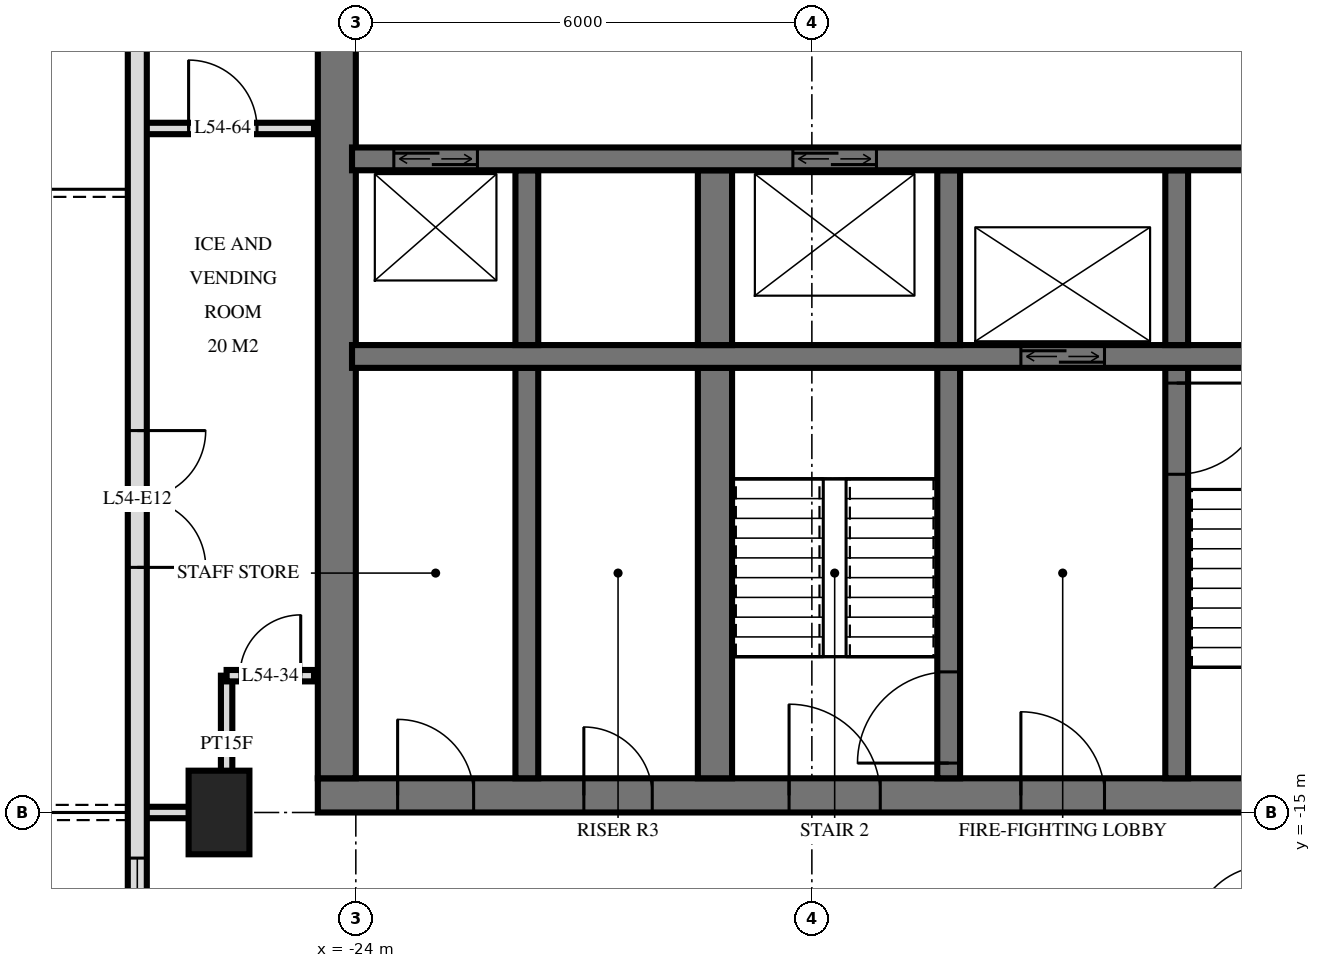
"""IFC4 building model, lengths in metres.
Left out: names, types, materials, properties, quantities, classifications, styles, units other than length and angle.
Written with IfcOpenShell. Run it as: python <this file> out.ifc"""

import sys

from ifc_helpers import new_model, si_unit, direction, frame, frame_2d, origin, origin_2d, place, context, subcontext, project, spatial, rectangle, extrude, element, fill, save


model = new_model("IFC4")
c1 = context("Model", 3, precision=1e-05, world=origin(), true_north=direction((0.0, 1.0)))
c2 = subcontext(c1, "Body", "Model", "MODEL_VIEW")
j1 = project(units=[si_unit("LENGTHUNIT", "METRE"), si_unit("PLANEANGLEUNIT", "RADIAN")], contexts=[c1])
p1 = place(None, origin())
s1 = spatial("IfcSite", under=j1, at=p1, CompositionType="ELEMENT")
p2 = place(p1, origin())
s2 = spatial("IfcBuilding", under=s1, at=p2, CompositionType="ELEMENT")
p3 = place(p2, frame((0.0, 0.0, 208.1)))
s3 = spatial("IfcBuildingStorey", under=s2, at=p3, CompositionType="ELEMENT", Elevation=208.1)
p4 = place(p3, frame((-25.8, -15.0, 0.0), z_axis=(0.0, 0.0, 1.0), x_axis=(0.0, 1.0, 0.0)))
e1 = element("IfcColumn", 1, at=p4, inside=s3, PredefinedType="COLUMN", context=c2, shape_type="SweptSolid", body=[
    extrude(rectangle(XDim=1.1, YDim=0.8, at=origin_2d()), origin(), (0.0, 0.0, 1.0), 3.5),
])
p5 = place(p3, frame((-24.5, -14.775, 0.0), z_axis=(0.0, 0.0, 1.0), x_axis=(1.0, 0.0, 0.0)))
e2 = element("IfcWall", 2, at=p5, inside=s3, PredefinedType="SHEAR", context=c2, shape_type="SweptSolid", body=[
    extrude(rectangle(XDim=14.5, YDim=0.45, at=frame_2d((7.25, 0.0))), origin(), (0.0, 0.0, 1.0), 3.5),
])
p6 = place(p5, frame((6.2, 0.0, 0.0)))
e3 = element("IfcOpeningElement", 3, at=p6, cuts=e2, PredefinedType="OPENING", context=c2, shape_type="SweptSolid", body=[
    extrude(rectangle(XDim=1.2, YDim=2.1, at=frame_2d((0.6, 1.05))), frame((0.0, 0.235, 0.0), z_axis=(0.0, -1.0, 0.0), x_axis=(1.0, 0.0, 0.0)), (0.0, 0.0, 1.0), 0.47),
])
p7 = place(p5, frame((9.25, 0.0, 0.0)))
e4 = element("IfcOpeningElement", 4, at=p7, cuts=e2, PredefinedType="OPENING", context=c2, shape_type="SweptSolid", body=[
    extrude(rectangle(XDim=1.1, YDim=2.1, at=frame_2d((0.55, 1.05))), frame((0.0, 0.235, 0.0), z_axis=(0.0, -1.0, 0.0), x_axis=(1.0, 0.0, 0.0)), (0.0, 0.0, 1.0), 0.47),
])
p8 = place(p5, frame((3.5, 0.0, 0.0)))
e5 = element("IfcOpeningElement", 5, at=p8, cuts=e2, PredefinedType="OPENING", context=c2, shape_type="SweptSolid", body=[
    extrude(rectangle(XDim=0.9, YDim=2.1, at=frame_2d((0.45, 1.05))), frame((0.0, 0.235, 0.0), z_axis=(0.0, -1.0, 0.0), x_axis=(1.0, 0.0, 0.0)), (0.0, 0.0, 1.0), 0.47),
])
p9 = place(p5, frame((1.05, 0.0, 0.0)))
e6 = element("IfcOpeningElement", 6, at=p9, cuts=e2, PredefinedType="OPENING", context=c2, shape_type="SweptSolid", body=[
    extrude(rectangle(XDim=1.0, YDim=2.1, at=frame_2d((0.5, 1.05))), frame((0.0, 0.235, 0.0), z_axis=(0.0, -1.0, 0.0), x_axis=(1.0, 0.0, 0.0)), (0.0, 0.0, 1.0), 0.47),
])
p10 = place(p3, frame((-24.25, -14.55, 0.0), z_axis=(0.0, 0.0, 1.0), x_axis=(0.0, 1.0, 0.0)))
e7 = element("IfcWall", 7, at=p10, inside=s3, PredefinedType="SHEAR", context=c2, shape_type="SweptSolid", body=[
    extrude(rectangle(XDim=14.1, YDim=0.5, at=frame_2d((7.05, 0.0))), origin(), (0.0, 0.0, 1.0), 3.5),
])
p11 = place(p3, frame((-24.05, -6.4, 0.0), z_axis=(0.0, 0.0, 1.0), x_axis=(1.0, 0.0, 0.0)))
e8 = element("IfcWall", 8, at=p11, inside=s3, PredefinedType="SHEAR", context=c2, shape_type="SweptSolid", body=[
    extrude(rectangle(XDim=13.7, YDim=0.3, at=frame_2d((6.85, 0.0))), origin(), (0.0, 0.0, 1.0), 3.5),
])
p12 = place(p11, frame((0.55, 0.0, 0.0)))
e9 = element("IfcOpeningElement", 9, at=p12, cuts=e8, PredefinedType="OPENING", context=c2, shape_type="SweptSolid", body=[
    extrude(rectangle(XDim=1.1, YDim=2.1, at=frame_2d((0.55, 1.05))), frame((0.0, 0.16, 0.0), z_axis=(0.0, -1.0, 0.0), x_axis=(1.0, 0.0, 0.0)), (0.0, 0.0, 1.0), 0.32),
])
p13 = place(p11, frame((5.8, 0.0, 0.0)))
e10 = element("IfcOpeningElement", 10, at=p13, cuts=e8, PredefinedType="OPENING", context=c2, shape_type="SweptSolid", body=[
    extrude(rectangle(XDim=1.1, YDim=2.1, at=frame_2d((0.55, 1.05))), frame((0.0, 0.16, 0.0), z_axis=(0.0, -1.0, 0.0), x_axis=(1.0, 0.0, 0.0)), (0.0, 0.0, 1.0), 0.32),
])
p14 = place(p3, frame((-24.05, -9.0, 0.0), z_axis=(0.0, 0.0, 1.0), x_axis=(1.0, 0.0, 0.0)))
e11 = element("IfcWall", 11, at=p14, inside=s3, PredefinedType="SHEAR", context=c2, shape_type="SweptSolid", body=[
    extrude(rectangle(XDim=13.7, YDim=0.3, at=frame_2d((6.85, 0.0))), origin(), (0.0, 0.0, 1.0), 3.5),
])
p15 = place(p14, frame((8.8, 0.0, 0.0)))
e12 = element("IfcOpeningElement", 12, at=p15, cuts=e11, PredefinedType="OPENING", context=c2, shape_type="SweptSolid", body=[
    extrude(rectangle(XDim=1.1, YDim=2.1, at=frame_2d((0.55, 1.05))), frame((0.0, 0.16, 0.0), z_axis=(0.0, -1.0, 0.0), x_axis=(1.0, 0.0, 0.0)), (0.0, 0.0, 1.0), 0.32),
])
p16 = place(p3, frame((-13.2, -8.85, 0.0), z_axis=(0.0, 0.0, 1.0), x_axis=(0.0, 1.0, 0.0)))
e13 = element("IfcWall", 13, at=p16, inside=s3, PredefinedType="SHEAR", context=c2, shape_type="SweptSolid", body=[
    extrude(rectangle(XDim=2.3, YDim=0.3, at=frame_2d((1.15, 0.0))), origin(), (0.0, 0.0, 1.0), 3.5),
])
p17 = place(p3, frame((-13.2, -14.55, 0.0), z_axis=(0.0, 0.0, 1.0), x_axis=(0.0, 1.0, 0.0)))
e14 = element("IfcWall", 14, at=p17, inside=s3, PredefinedType="SHEAR", context=c2, shape_type="SweptSolid", body=[
    extrude(rectangle(XDim=5.4, YDim=0.3, at=frame_2d((2.7, 0.0))), origin(), (0.0, 0.0, 1.0), 3.5),
])
p18 = place(p17, frame((4.0, 0.0, 0.0)))
e15 = element("IfcOpeningElement", 15, at=p18, cuts=e14, PredefinedType="OPENING", context=c2, shape_type="SweptSolid", body=[
    extrude(rectangle(XDim=1.2, YDim=2.1, at=frame_2d((0.6, 1.05))), frame((0.0, 0.16, 0.0), z_axis=(0.0, -1.0, 0.0), x_axis=(1.0, 0.0, 0.0)), (0.0, 0.0, 1.0), 0.32),
])
p19 = place(p3, frame((-16.2, -8.85, 0.0), z_axis=(0.0, 0.0, 1.0), x_axis=(0.0, 1.0, 0.0)))
e16 = element("IfcWall", 16, at=p19, inside=s3, PredefinedType="SHEAR", context=c2, shape_type="SweptSolid", body=[
    extrude(rectangle(XDim=2.3, YDim=0.3, at=frame_2d((1.15, 0.0))), origin(), (0.0, 0.0, 1.0), 3.5),
])
p20 = place(p3, frame((-16.2, -14.55, 0.0), z_axis=(0.0, 0.0, 1.0), x_axis=(0.0, 1.0, 0.0)))
e17 = element("IfcWall", 17, at=p20, inside=s3, PredefinedType="SHEAR", context=c2, shape_type="SweptSolid", body=[
    extrude(rectangle(XDim=5.4, YDim=0.3, at=frame_2d((2.7, 0.0))), origin(), (0.0, 0.0, 1.0), 3.5),
])
p21 = place(p20, frame((0.2, 0.0, 0.0)))
e18 = element("IfcOpeningElement", 18, at=p21, cuts=e17, PredefinedType="OPENING", context=c2, shape_type="SweptSolid", body=[
    extrude(rectangle(XDim=1.2, YDim=2.1, at=frame_2d((0.6, 1.05))), frame((0.0, 0.16, 0.0), z_axis=(0.0, -1.0, 0.0), x_axis=(1.0, 0.0, 0.0)), (0.0, 0.0, 1.0), 0.32),
])
p22 = place(p3, frame((-19.275, -8.85, 0.0), z_axis=(0.0, 0.0, 1.0), x_axis=(0.0, 1.0, 0.0)))
e19 = element("IfcWall", 19, at=p22, inside=s3, PredefinedType="SHEAR", context=c2, shape_type="SweptSolid", body=[
    extrude(rectangle(XDim=2.3, YDim=0.45, at=frame_2d((1.15, 0.0))), origin(), (0.0, 0.0, 1.0), 3.5),
])
p23 = place(p3, frame((-19.275, -14.55, 0.0), z_axis=(0.0, 0.0, 1.0), x_axis=(0.0, 1.0, 0.0)))
e20 = element("IfcWall", 20, at=p23, inside=s3, PredefinedType="SHEAR", context=c2, shape_type="SweptSolid", body=[
    extrude(rectangle(XDim=5.4, YDim=0.45, at=frame_2d((2.7, 0.0))), origin(), (0.0, 0.0, 1.0), 3.5),
])
p24 = place(p3, frame((-21.75, -8.85, 0.0), z_axis=(0.0, 0.0, 1.0), x_axis=(0.0, 1.0, 0.0)))
e21 = element("IfcWall", 21, at=p24, inside=s3, PredefinedType="SHEAR", context=c2, shape_type="SweptSolid", body=[
    extrude(rectangle(XDim=2.3, YDim=0.3, at=frame_2d((1.15, 0.0))), origin(), (0.0, 0.0, 1.0), 3.5),
])
p25 = place(p3, frame((-21.75, -14.55, 0.0), z_axis=(0.0, 0.0, 1.0), x_axis=(0.0, 1.0, 0.0)))
e22 = element("IfcWall", 22, at=p25, inside=s3, PredefinedType="SHEAR", context=c2, shape_type="SweptSolid", body=[
    extrude(rectangle(XDim=5.4, YDim=0.3, at=frame_2d((2.7, 0.0))), origin(), (0.0, 0.0, 1.0), 3.5),
])
p26 = place(p3, frame((-26.875, -3.325, 0.0), z_axis=(0.0, 0.0, 1.0), x_axis=(0.0, -1.0, 0.0)))
e23 = element("IfcWall", 23, at=p26, inside=s3, PredefinedType="SOLIDWALL", context=c2, shape_type="SweptSolid", body=[
    extrude(rectangle(XDim=21.551, YDim=0.25, at=frame_2d((10.775, 0.0))), origin(), (0.0, 0.0, 1.0), 3.22),
])
p27 = place(p26, frame((6.65, 0.0, 0.0)))
e24 = element("IfcOpeningElement", 24, at=p27, cuts=e23, PredefinedType="OPENING", context=c2, shape_type="SweptSolid", body=[
    extrude(rectangle(XDim=1.8, YDim=2.4, at=frame_2d((0.9, 1.2))), frame((0.0, 0.135, 0.0), z_axis=(0.0, -1.0, 0.0), x_axis=(1.0, 0.0, 0.0)), (0.0, 0.0, 1.0), 0.27),
])
p28 = place(p26, frame((12.275, 0.0, 0.9)))
e25 = element("IfcOpeningElement", 25, at=p28, cuts=e23, PredefinedType="OPENING", context=c2, shape_type="SweptSolid", body=[
    extrude(rectangle(XDim=1.2, YDim=1.5, at=frame_2d((0.6, 0.75))), frame((0.0, 0.135, 0.0), z_axis=(0.0, -1.0, 0.0), x_axis=(1.0, 0.0, 0.0)), (0.0, 0.0, 1.0), 0.27),
])
p29 = place(p26, frame((14.675, 0.0, 0.0)))
e26 = element("IfcOpeningElement", 26, at=p29, cuts=e23, PredefinedType="OPENING", context=c2, shape_type="SweptSolid", body=[
    extrude(rectangle(XDim=1.8, YDim=2.4, at=frame_2d((0.9, 1.2))), frame((0.0, 0.135, 0.0), z_axis=(0.0, -1.0, 0.0), x_axis=(1.0, 0.0, 0.0)), (0.0, 0.0, 1.0), 0.27),
])
p30 = place(p26, frame((18.875, 0.0, 0.0)))
e27 = element("IfcOpeningElement", 27, at=p30, cuts=e23, PredefinedType="OPENING", context=c2, shape_type="SweptSolid", body=[
    extrude(rectangle(XDim=1.8, YDim=2.4, at=frame_2d((0.9, 1.2))), frame((0.0, 0.135, 0.0), z_axis=(0.0, -1.0, 0.0), x_axis=(1.0, 0.0, 0.0)), (0.0, 0.0, 1.0), 0.27),
])
p31 = place(p3, frame((-25.7, -15.0, 0.0), z_axis=(0.0, 0.0, 1.0), x_axis=(0.0, 1.0, 0.0)))
e28 = element("IfcWall", 28, at=p31, inside=s3, PredefinedType="PARTITIONING", context=c2, shape_type="SweptSolid", body=[
    extrude(rectangle(XDim=1.8, YDim=0.15, at=frame_2d((0.9, 0.0))), origin(), (0.0, 0.0, 1.0), 3.22),
])
p32 = place(p3, frame((-26.82, -15.0, 0.0), z_axis=(0.0, 0.0, 1.0), x_axis=(1.0, 0.0, 0.0)))
e29 = element("IfcWall", 29, at=p32, inside=s3, PredefinedType="PARTITIONING", context=c2, shape_type="SweptSolid", body=[
    extrude(rectangle(XDim=1.12, YDim=0.15, at=frame_2d((0.56, 0.0))), origin(), (0.0, 0.0, 1.0), 3.22),
])
p33 = place(p3, frame((-25.7, -13.2, 0.0), z_axis=(0.0, 0.0, 1.0), x_axis=(1.0, 0.0, 0.0)))
e30 = element("IfcWall", 30, at=p33, inside=s3, PredefinedType="PARTITIONING", context=c2, shape_type="SweptSolid", body=[
    extrude(rectangle(XDim=1.15, YDim=0.15, at=frame_2d((0.575, 0.0))), origin(), (0.0, 0.0, 1.0), 3.22),
])
p34 = place(p33, frame((0.175, 0.0, 0.0)))
e31 = element("IfcOpeningElement", 31, at=p34, cuts=e30, PredefinedType="OPENING", context=c2, shape_type="SweptSolid", body=[
    extrude(rectangle(XDim=0.8, YDim=2.1, at=frame_2d((0.4, 1.05))), frame((0.0, 0.085, 0.0), z_axis=(0.0, -1.0, 0.0), x_axis=(1.0, 0.0, 0.0)), (0.0, 0.0, 1.0), 0.17),
])
p35 = place(p3, frame((-26.82, -6.0, 0.0), z_axis=(0.0, 0.0, 1.0), x_axis=(1.0, 0.0, 0.0)))
e32 = element("IfcWall", 32, at=p35, inside=s3, PredefinedType="PARTITIONING", context=c2, shape_type="SweptSolid", body=[
    extrude(rectangle(XDim=2.27, YDim=0.15, at=frame_2d((1.135, 0.0))), origin(), (0.0, 0.0, 1.0), 3.22),
])
p36 = place(p35, frame((0.62, 0.0, 0.0)))
e33 = element("IfcOpeningElement", 33, at=p36, cuts=e32, PredefinedType="OPENING", context=c2, shape_type="SweptSolid", body=[
    extrude(rectangle(XDim=0.9, YDim=2.1, at=frame_2d((0.45, 1.05))), frame((0.0, 0.085, 0.0), z_axis=(0.0, -1.0, 0.0), x_axis=(1.0, 0.0, 0.0)), (0.0, 0.0, 1.0), 0.17),
])
p37 = place(p27, origin())
e34 = element("IfcDoor", 34, at=p37, inside=s3, OperationType="DOUBLE_DOOR_SINGLE_SWING", PredefinedType="DOOR", context=c2, shape_type="SweptSolid", body=[
    extrude(rectangle(XDim=1.8, YDim=2.4, at=frame_2d((0.9, 1.2))), frame((0.0, 0.025, 0.0), z_axis=(0.0, -1.0, 0.0), x_axis=(1.0, 0.0, 0.0)), (0.0, 0.0, 1.0), 0.05),
])
fill(e24, e34)
p38 = place(p28, origin())
e35 = element("IfcWindow", 35, at=p38, inside=s3, PartitioningType="SINGLE_PANEL", PredefinedType="WINDOW", context=c2, shape_type="SweptSolid", body=[
    extrude(rectangle(XDim=1.2, YDim=1.5, at=frame_2d((0.6, 0.75))), frame((0.0, 0.03, 0.0), z_axis=(0.0, -1.0, 0.0), x_axis=(1.0, 0.0, 0.0)), (0.0, 0.0, 1.0), 0.06),
])
fill(e25, e35)
p39 = place(p12, origin())
e36 = element("IfcDoor", 36, at=p39, inside=s3, OperationType="DOUBLE_DOOR_SLIDING", PredefinedType="USERDEFINED", context=c2, shape_type="SweptSolid", body=[
    extrude(rectangle(XDim=1.1, YDim=2.1, at=frame_2d((0.55, 1.05))), frame((0.0, 0.025, 0.0), z_axis=(0.0, -1.0, 0.0), x_axis=(1.0, 0.0, 0.0)), (0.0, 0.0, 1.0), 0.05),
])
fill(e9, e36)
p40 = place(p15, origin())
e37 = element("IfcDoor", 37, at=p40, inside=s3, OperationType="DOUBLE_DOOR_SLIDING", PredefinedType="USERDEFINED", context=c2, shape_type="SweptSolid", body=[
    extrude(rectangle(XDim=1.1, YDim=2.1, at=frame_2d((0.55, 1.05))), frame((0.0, 0.025, 0.0), z_axis=(0.0, -1.0, 0.0), x_axis=(1.0, 0.0, 0.0)), (0.0, 0.0, 1.0), 0.05),
])
fill(e12, e37)
p41 = place(p13, origin())
e38 = element("IfcDoor", 38, at=p41, inside=s3, OperationType="DOUBLE_DOOR_SLIDING", PredefinedType="USERDEFINED", context=c2, shape_type="SweptSolid", body=[
    extrude(rectangle(XDim=1.1, YDim=2.1, at=frame_2d((0.55, 1.05))), frame((0.0, 0.025, 0.0), z_axis=(0.0, -1.0, 0.0), x_axis=(1.0, 0.0, 0.0)), (0.0, 0.0, 1.0), 0.05),
])
fill(e10, e38)
p42 = place(p6, origin())
e39 = element("IfcDoor", 39, at=p42, inside=s3, OperationType="SINGLE_SWING_RIGHT", PredefinedType="DOOR", context=c2, shape_type="SweptSolid", body=[
    extrude(rectangle(XDim=1.2, YDim=2.1, at=frame_2d((0.6, 1.05))), frame((0.0, 0.025, 0.0), z_axis=(0.0, -1.0, 0.0), x_axis=(1.0, 0.0, 0.0)), (0.0, 0.0, 1.0), 0.05),
])
fill(e3, e39)
p43 = place(p7, origin())
e40 = element("IfcDoor", 40, at=p43, inside=s3, OperationType="SINGLE_SWING_RIGHT", PredefinedType="DOOR", context=c2, shape_type="SweptSolid", body=[
    extrude(rectangle(XDim=1.1, YDim=2.1, at=frame_2d((0.55, 1.05))), frame((0.0, 0.025, 0.0), z_axis=(0.0, -1.0, 0.0), x_axis=(1.0, 0.0, 0.0)), (0.0, 0.0, 1.0), 0.05),
])
fill(e4, e40)
p44 = place(p8, origin())
e41 = element("IfcDoor", 41, at=p44, inside=s3, OperationType="SINGLE_SWING_RIGHT", PredefinedType="DOOR", context=c2, shape_type="SweptSolid", body=[
    extrude(rectangle(XDim=0.9, YDim=2.1, at=frame_2d((0.45, 1.05))), frame((0.0, 0.025, 0.0), z_axis=(0.0, -1.0, 0.0), x_axis=(1.0, 0.0, 0.0)), (0.0, 0.0, 1.0), 0.05),
])
fill(e5, e41)
p45 = place(p9, origin())
e42 = element("IfcDoor", 42, at=p45, inside=s3, OperationType="SINGLE_SWING_RIGHT", PredefinedType="DOOR", context=c2, shape_type="SweptSolid", body=[
    extrude(rectangle(XDim=1.0, YDim=2.1, at=frame_2d((0.5, 1.05))), frame((0.0, 0.025, 0.0), z_axis=(0.0, -1.0, 0.0), x_axis=(1.0, 0.0, 0.0)), (0.0, 0.0, 1.0), 0.05),
])
fill(e6, e42)
p46 = place(p18, frame((0.6, 0.0, 0.0), z_axis=(0.0, 0.0, 1.0), x_axis=(-1.0, 0.0, 0.0)))
e43 = element("IfcDoor", 43, at=p46, inside=s3, OperationType="SINGLE_SWING_RIGHT", PredefinedType="DOOR", context=c2, shape_type="SweptSolid", body=[
    extrude(rectangle(XDim=1.2, YDim=2.1, at=frame_2d((0.0, 1.05))), frame((0.0, -0.025, 0.0), z_axis=(0.0, 1.0, 0.0), x_axis=(-1.0, 0.0, 0.0)), (0.0, 0.0, 1.0), 0.05),
])
fill(e15, e43)
p47 = place(p21, origin())
e44 = element("IfcDoor", 44, at=p47, inside=s3, OperationType="SINGLE_SWING_RIGHT", PredefinedType="DOOR", context=c2, shape_type="SweptSolid", body=[
    extrude(rectangle(XDim=1.2, YDim=2.1, at=frame_2d((0.6, 1.05))), frame((0.0, 0.025, 0.0), z_axis=(0.0, -1.0, 0.0), x_axis=(1.0, 0.0, 0.0)), (0.0, 0.0, 1.0), 0.05),
])
fill(e18, e44)
p48 = place(p34, origin())
e45 = element("IfcDoor", 45, at=p48, inside=s3, OperationType="SINGLE_SWING_LEFT", PredefinedType="DOOR", context=c2, shape_type="SweptSolid", body=[
    extrude(rectangle(XDim=0.8, YDim=2.1, at=frame_2d((0.4, 1.05))), frame((0.0, 0.025, 0.0), z_axis=(0.0, -1.0, 0.0), x_axis=(1.0, 0.0, 0.0)), (0.0, 0.0, 1.0), 0.05),
])
fill(e31, e45)
p49 = place(p36, origin())
e46 = element("IfcDoor", 46, at=p49, inside=s3, OperationType="SINGLE_SWING_RIGHT", PredefinedType="DOOR", context=c2, shape_type="SweptSolid", body=[
    extrude(rectangle(XDim=0.9, YDim=2.1, at=frame_2d((0.45, 1.05))), frame((0.0, 0.025, 0.0), z_axis=(0.0, -1.0, 0.0), x_axis=(1.0, 0.0, 0.0)), (0.0, 0.0, 1.0), 0.05),
])
fill(e33, e46)
save(model, sys.argv[1])
